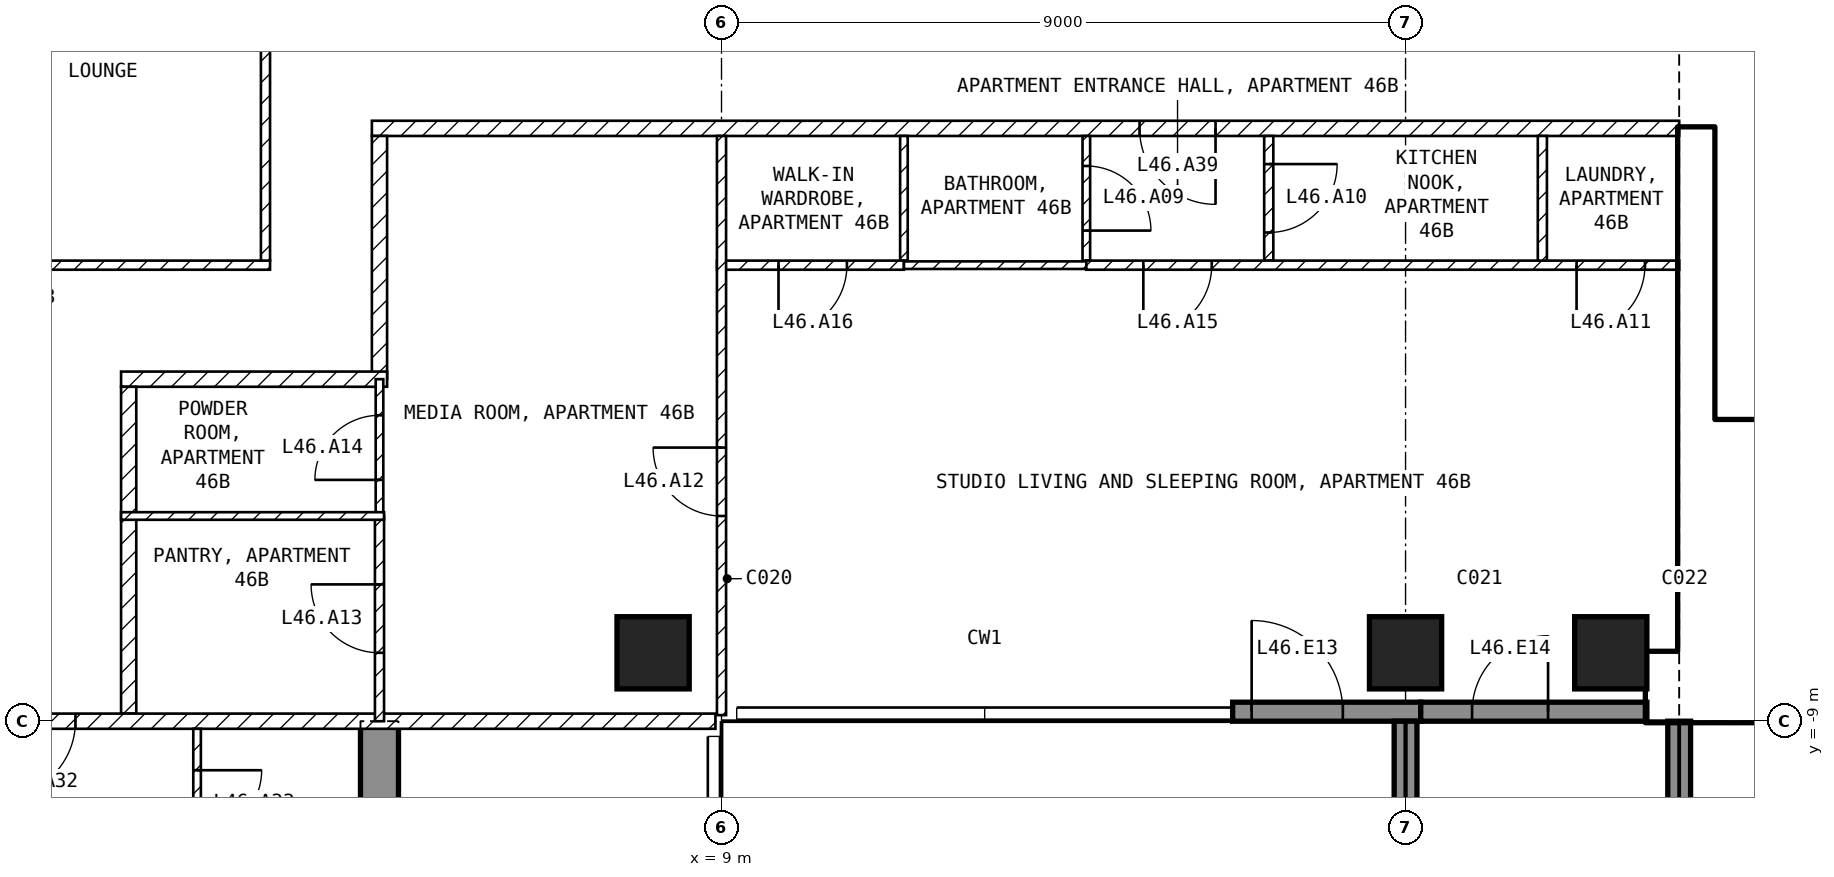
"""IFC4 building model, lengths in metres.
Left out: names, types, materials, properties, quantities, classifications, styles, units other than length and angle.
Written with IfcOpenShell. Run it as: python <this file> out.ifc"""

import sys

from ifc_helpers import new_model, si_unit, direction, frame, frame_2d, origin, origin_2d, place, context, subcontext, project, spatial, polyline, rectangle, outline, extrude, element, fill, save


model = new_model("IFC4")
c1 = context("Model", 3, precision=1e-05, world=origin(), true_north=direction((0.0, 1.0)))
c2 = subcontext(c1, "Body", "Model", "MODEL_VIEW")
j1 = project(units=[si_unit("LENGTHUNIT", "METRE"), si_unit("PLANEANGLEUNIT", "RADIAN")], contexts=[c1])
p1 = place(None, origin())
s1 = spatial("IfcSite", under=j1, at=p1, CompositionType="ELEMENT")
p2 = place(p1, origin())
s2 = spatial("IfcBuilding", under=s1, at=p2, CompositionType="ELEMENT")
p3 = place(p2, frame((0.0, 0.0, 187.6)))
s3 = spatial("IfcBuildingStorey", under=s2, at=p3, CompositionType="ELEMENT", Elevation=187.6)
for number, where, z_axis, x_axis in (
    (1, (8.1, -8.1, -0.25), (0.0, 0.0, 1.0), (1.0, 0.0, 0.0)),
    (2, (18.0, -8.1, -0.25), (0.0, 0.0, 1.0), (1.0, 0.0, 0.0)),
    (3, (20.7, -8.1, -0.25), (0.0, 0.0, 1.0), (1.0, 0.0, 0.0)),
):
    element("IfcColumn", number, at=place(p3, frame(where, z_axis=z_axis, x_axis=x_axis)), inside=s3, PredefinedType="COLUMN", context=c2, shape_type="SweptSolid", body=[
        extrude(rectangle(XDim=0.95, YDim=0.95, at=origin_2d()), origin(), (0.0, 0.0, 1.0), 3.5),
    ])
p4 = place(p3, frame((4.25, -20.225, -0.25), z_axis=(1.0, 0.0, 0.0), x_axis=(0.0, 1.0, 0.0)))
e4 = element("IfcWall", 4, at=p4, inside=s3, PredefinedType="SHEAR", context=c2, shape_type="SweptSolid", body=[
    extrude(outline(polyline([(0.0, 0.0), (6.725, 0.0), (6.725, 2.65), (9.125, 2.65), (9.125, 0.0), (11.225, 0.0), (11.225, 3.5), (0.0, 3.5), (0.0, 0.0)])), origin(), (0.0, 0.0, 1.0), 0.5),
])
p5 = place(p3, frame((15.725, -8.875, 0.0), z_axis=(0.0, 0.0, 1.0), x_axis=(1.0, 0.0, 0.0)))
e5 = element("IfcWall", 5, at=p5, inside=s3, PredefinedType="SOLIDWALL", context=c2, shape_type="SweptSolid", body=[
    extrude(rectangle(XDim=2.475, YDim=0.25, at=frame_2d((1.237, 0.0))), origin(), (0.0, 0.0, 1.0), 3.25),
])
p6 = place(p5, frame((0.25, 0.0, 0.0)))
e6 = element("IfcOpeningElement", 6, at=p6, cuts=e5, PredefinedType="OPENING", context=c2, shape_type="SweptSolid", body=[
    extrude(rectangle(XDim=1.2, YDim=2.4, at=frame_2d((0.6, 1.2))), frame((0.0, 0.135, 0.0), z_axis=(0.0, -1.0, 0.0), x_axis=(1.0, 0.0, 0.0)), (0.0, 0.0, 1.0), 0.27),
])
p7 = place(p3, frame((18.2, -8.875, 0.0), z_axis=(0.0, 0.0, 1.0), x_axis=(1.0, 0.0, 0.0)))
e7 = element("IfcWall", 7, at=p7, inside=s3, PredefinedType="SOLIDWALL", context=c2, shape_type="SweptSolid", body=[
    extrude(rectangle(XDim=2.975, YDim=0.25, at=frame_2d((1.488, 0.0))), origin(), (0.0, 0.0, 1.0), 3.25),
])
p8 = place(p7, frame((0.675, 0.0, 0.0)))
e8 = element("IfcOpeningElement", 8, at=p8, cuts=e7, PredefinedType="OPENING", context=c2, shape_type="SweptSolid", body=[
    extrude(rectangle(XDim=1.0, YDim=2.4, at=frame_2d((0.5, 1.2))), frame((0.0, 0.135, 0.0), z_axis=(0.0, -1.0, 0.0), x_axis=(1.0, 0.0, 0.0)), (0.0, 0.0, 1.0), 0.27),
])
for number, where, z_axis, x_axis in (
    (9, (18.0, -9.0, 0.0), (0.0, 0.0, 1.0), (0.0, -1.0, 0.0)),
    (10, (21.6, -9.0, 0.0), (0.0, 0.0, 1.0), (0.0, -1.0, 0.0)),
):
    element("IfcWall", number, at=place(p3, frame(where, z_axis=z_axis, x_axis=x_axis)), inside=s3, PredefinedType="SOLIDWALL", context=c2, shape_type="SweptSolid", body=[
        extrude(rectangle(XDim=2.7, YDim=0.3, at=frame_2d((1.35, 0.0))), origin(), (0.0, 0.0, 1.0), 3.25),
    ])
p9 = place(p3, frame((21.175, -8.55, 0.0), z_axis=(0.0, 0.0, 1.0), x_axis=(1.0, 0.0, 0.0)))
e11 = element("IfcWall", 11, at=p9, inside=s3, PredefinedType="SHEAR", context=c2, shape_type="SweptSolid", body=[
    extrude(rectangle(XDim=9.025, YDim=0.9, at=frame_2d((4.512, 0.0))), origin(), (0.0, 0.0, 1.0), 3.25),
])
p10 = place(p3, frame((21.825, -8.1, 0.0), z_axis=(0.0, 0.0, 1.0), x_axis=(0.0, 1.0, 0.0)))
e12 = element("IfcWall", 12, at=p10, inside=s3, PredefinedType="SHEAR", context=c2, shape_type="SweptSolid", body=[
    extrude(rectangle(XDim=6.9, YDim=0.45, at=frame_2d((3.45, 0.0))), origin(), (0.0, 0.0, 1.0), 3.25),
])
p11 = place(p3, frame((22.05, -5.15, 0.0), z_axis=(0.0, 0.0, 1.0), x_axis=(1.0, 0.0, 0.0)))
e13 = element("IfcWall", 13, at=p11, inside=s3, PredefinedType="SOLIDWALL", context=c2, shape_type="SweptSolid", body=[
    extrude(rectangle(XDim=6.3, YDim=0.2, at=frame_2d((3.15, 0.0))), origin(), (0.0, 0.0, 1.0), 3.25),
])
p12 = place(p11, frame((0.2, 0.0, 0.0)))
e14 = element("IfcOpeningElement", 14, at=p12, cuts=e13, PredefinedType="OPENING", context=c2, shape_type="SweptSolid", body=[
    extrude(rectangle(XDim=1.0, YDim=2.1, at=frame_2d((0.5, 1.05))), frame((0.0, 0.11, 0.0), z_axis=(0.0, -1.0, 0.0), x_axis=(1.0, 0.0, 0.0)), (0.0, 0.0, 1.0), 0.22),
])
p13 = place(p3, frame((-3.06, -3.0, 0.0), z_axis=(0.0, 0.0, 1.0), x_axis=(1.0, 0.0, 0.0)))
e15 = element("IfcWall", 15, at=p13, inside=s3, PredefinedType="PARTITIONING", context=c2, shape_type="SweptSolid", body=[
    extrude(rectangle(XDim=6.12, YDim=0.12, at=frame_2d((3.06, 0.0))), origin(), (0.0, 0.0, 1.0), 3.25),
])
p14 = place(p3, frame((3.0, -2.94, 0.0), z_axis=(0.0, 0.0, 1.0), x_axis=(0.0, 1.0, 0.0)))
e16 = element("IfcWall", 16, at=p14, inside=s3, PredefinedType="PARTITIONING", context=c2, shape_type="SweptSolid", body=[
    extrude(rectangle(XDim=5.88, YDim=0.12, at=frame_2d((2.94, 0.0))), origin(), (0.0, 0.0, 1.0), 3.25),
])
p15 = place(p3, frame((21.6, -1.2, 0.0), z_axis=(0.0, 0.0, 1.0), x_axis=(-1.0, 0.0, 0.0)))
e17 = element("IfcWall", 17, at=p15, inside=s3, PredefinedType="PARTITIONING", context=c2, shape_type="SweptSolid", body=[
    extrude(rectangle(XDim=17.2, YDim=0.2, at=frame_2d((8.6, 0.0))), origin(), (0.0, 0.0, 1.0), 3.25),
])
p16 = place(p15, frame((6.1, 0.0, 0.0)))
e18 = element("IfcOpeningElement", 18, at=p16, cuts=e17, PredefinedType="OPENING", context=c2, shape_type="SweptSolid", body=[
    extrude(rectangle(XDim=1.0, YDim=2.1, at=frame_2d((0.5, 1.05))), frame((0.0, 0.11, 0.0), z_axis=(0.0, -1.0, 0.0), x_axis=(1.0, 0.0, 0.0)), (0.0, 0.0, 1.0), 0.22),
])
p17 = place(p3, frame((4.5, -1.3, 0.0), z_axis=(0.0, 0.0, 1.0), x_axis=(0.0, -1.0, 0.0)))
e19 = element("IfcWall", 19, at=p17, inside=s3, PredefinedType="PARTITIONING", context=c2, shape_type="SweptSolid", body=[
    extrude(rectangle(XDim=3.2, YDim=0.2, at=frame_2d((1.6, 0.0))), origin(), (0.0, 0.0, 1.0), 3.25),
])
p18 = place(p3, frame((4.6, -4.5, 0.0), z_axis=(0.0, 0.0, 1.0), x_axis=(-1.0, 0.0, 0.0)))
e20 = element("IfcWall", 20, at=p18, inside=s3, PredefinedType="PARTITIONING", context=c2, shape_type="SweptSolid", body=[
    extrude(rectangle(XDim=3.5, YDim=0.2, at=frame_2d((1.75, 0.0))), origin(), (0.0, 0.0, 1.0), 3.25),
])
p19 = place(p3, frame((1.2, -4.6, 0.0), z_axis=(0.0, 0.0, 1.0), x_axis=(0.0, -1.0, 0.0)))
e21 = element("IfcWall", 21, at=p19, inside=s3, PredefinedType="PARTITIONING", context=c2, shape_type="SweptSolid", body=[
    extrude(rectangle(XDim=4.3, YDim=0.2, at=frame_2d((2.15, 0.0))), origin(), (0.0, 0.0, 1.0), 3.25),
])
p20 = place(p3, frame((8.92, -9.0, 0.0), z_axis=(0.0, 0.0, 1.0), x_axis=(-1.0, 0.0, 0.0)))
e22 = element("IfcWall", 22, at=p20, inside=s3, PredefinedType="PARTITIONING", context=c2, shape_type="SweptSolid", body=[
    extrude(rectangle(XDim=17.84, YDim=0.2, at=frame_2d((8.92, 0.0))), origin(), (0.0, 0.0, 1.0), 3.25),
])
p21 = place(p20, frame((8.42, 0.0, 0.0)))
e23 = element("IfcOpeningElement", 23, at=p21, cuts=e22, PredefinedType="OPENING", context=c2, shape_type="SweptSolid", body=[
    extrude(rectangle(XDim=1.0, YDim=2.1, at=frame_2d((0.5, 1.05))), frame((0.0, 0.11, 0.0), z_axis=(0.0, -1.0, 0.0), x_axis=(1.0, 0.0, 0.0)), (0.0, 0.0, 1.0), 0.22),
])
p22 = place(p3, frame((11.4, -1.3, 0.0), z_axis=(0.0, 0.0, 1.0), x_axis=(0.0, -1.0, 0.0)))
e24 = element("IfcWall", 24, at=p22, inside=s3, PredefinedType="PARTITIONING", context=c2, shape_type="SweptSolid", body=[
    extrude(rectangle(XDim=1.64, YDim=0.1, at=frame_2d((0.82, 0.0))), origin(), (0.0, 0.0, 1.0), 3.25),
])
p23 = place(p3, frame((11.4, -3.0, 0.0), z_axis=(0.0, 0.0, 1.0), x_axis=(-1.0, 0.0, 0.0)))
e25 = element("IfcWall", 25, at=p23, inside=s3, PredefinedType="PARTITIONING", context=c2, shape_type="SweptSolid", body=[
    extrude(rectangle(XDim=2.46, YDim=0.12, at=frame_2d((1.23, 0.0))), origin(), (0.0, 0.0, 1.0), 3.25),
])
p24 = place(p23, frame((0.75, 0.0, 0.0)))
e26 = element("IfcOpeningElement", 26, at=p24, cuts=e25, PredefinedType="OPENING", context=c2, shape_type="SweptSolid", body=[
    extrude(rectangle(XDim=0.9, YDim=2.1, at=frame_2d((0.45, 1.05))), frame((0.0, 0.07, 0.0), z_axis=(0.0, -1.0, 0.0), x_axis=(1.0, 0.0, 0.0)), (0.0, 0.0, 1.0), 0.14),
])
p25 = place(p3, frame((9.0, -8.92, 0.0), z_axis=(0.0, 0.0, 1.0), x_axis=(0.0, 1.0, 0.0)))
e27 = element("IfcWall", 27, at=p25, inside=s3, PredefinedType="PARTITIONING", context=c2, shape_type="SweptSolid", body=[
    extrude(rectangle(XDim=7.62, YDim=0.12, at=frame_2d((3.81, 0.0))), origin(), (0.0, 0.0, 1.0), 3.25),
])
p26 = place(p25, frame((2.62, 0.0, 0.0)))
e28 = element("IfcOpeningElement", 28, at=p26, cuts=e27, PredefinedType="OPENING", context=c2, shape_type="SweptSolid", body=[
    extrude(rectangle(XDim=0.9, YDim=2.1, at=frame_2d((0.45, 1.05))), frame((0.0, 0.07, 0.0), z_axis=(0.0, -1.0, 0.0), x_axis=(1.0, 0.0, 0.0)), (0.0, 0.0, 1.0), 0.14),
])
p27 = place(p3, frame((13.8, -1.3, 0.0), z_axis=(0.0, 0.0, 1.0), x_axis=(0.0, -1.0, 0.0)))
e29 = element("IfcWall", 29, at=p27, inside=s3, PredefinedType="PARTITIONING", context=c2, shape_type="SweptSolid", body=[
    extrude(rectangle(XDim=1.64, YDim=0.1, at=frame_2d((0.82, 0.0))), origin(), (0.0, 0.0, 1.0), 3.25),
])
p28 = place(p27, frame((0.395, 0.0, 0.0)))
e30 = element("IfcOpeningElement", 30, at=p28, cuts=e29, PredefinedType="OPENING", context=c2, shape_type="SweptSolid", body=[
    extrude(rectangle(XDim=0.85, YDim=2.1, at=frame_2d((0.425, 1.05))), frame((0.0, 0.06, 0.0), z_axis=(0.0, -1.0, 0.0), x_axis=(1.0, 0.0, 0.0)), (0.0, 0.0, 1.0), 0.12),
])
p29 = place(p3, frame((13.8, -3.0, 0.0), z_axis=(0.0, 0.0, 1.0), x_axis=(-1.0, 0.0, 0.0)))
e31 = element("IfcWall", 31, at=p29, inside=s3, PredefinedType="PARTITIONING", context=c2, shape_type="SweptSolid", body=[
    extrude(rectangle(XDim=2.4, YDim=0.1, at=frame_2d((1.2, 0.0))), origin(), (0.0, 0.0, 1.0), 3.25),
])
p30 = place(p3, frame((16.2, -1.3, 0.0), z_axis=(0.0, 0.0, 1.0), x_axis=(0.0, -1.0, 0.0)))
e32 = element("IfcWall", 32, at=p30, inside=s3, PredefinedType="PARTITIONING", context=c2, shape_type="SweptSolid", body=[
    extrude(rectangle(XDim=1.64, YDim=0.12, at=frame_2d((0.82, 0.0))), origin(), (0.0, 0.0, 1.0), 3.25),
])
p31 = place(p30, frame((0.37, 0.0, 0.0)))
e33 = element("IfcOpeningElement", 33, at=p31, cuts=e32, PredefinedType="OPENING", context=c2, shape_type="SweptSolid", body=[
    extrude(rectangle(XDim=0.9, YDim=2.1, at=frame_2d((0.45, 1.05))), frame((0.0, 0.07, 0.0), z_axis=(0.0, -1.0, 0.0), x_axis=(1.0, 0.0, 0.0)), (0.0, 0.0, 1.0), 0.14),
])
p32 = place(p3, frame((21.6, -3.0, 0.0), z_axis=(0.0, 0.0, 1.0), x_axis=(-1.0, 0.0, 0.0)))
e34 = element("IfcWall", 34, at=p32, inside=s3, PredefinedType="PARTITIONING", context=c2, shape_type="SweptSolid", body=[
    extrude(rectangle(XDim=7.8, YDim=0.12, at=frame_2d((3.9, 0.0))), origin(), (0.0, 0.0, 1.0), 3.25),
])
p33 = place(p32, frame((0.45, 0.0, 0.0)))
e35 = element("IfcOpeningElement", 35, at=p33, cuts=e34, PredefinedType="OPENING", context=c2, shape_type="SweptSolid", body=[
    extrude(rectangle(XDim=0.9, YDim=2.1, at=frame_2d((0.45, 1.05))), frame((0.0, 0.07, 0.0), z_axis=(0.0, -1.0, 0.0), x_axis=(1.0, 0.0, 0.0)), (0.0, 0.0, 1.0), 0.14),
])
p34 = place(p32, frame((6.15, 0.0, 0.0)))
e36 = element("IfcOpeningElement", 36, at=p34, cuts=e34, PredefinedType="OPENING", context=c2, shape_type="SweptSolid", body=[
    extrude(rectangle(XDim=0.9, YDim=2.1, at=frame_2d((0.45, 1.05))), frame((0.0, 0.07, 0.0), z_axis=(0.0, -1.0, 0.0), x_axis=(1.0, 0.0, 0.0)), (0.0, 0.0, 1.0), 0.14),
])
p35 = place(p3, frame((19.8, -1.3, 0.0), z_axis=(0.0, 0.0, 1.0), x_axis=(0.0, -1.0, 0.0)))
e37 = element("IfcWall", 37, at=p35, inside=s3, PredefinedType="PARTITIONING", context=c2, shape_type="SweptSolid", body=[
    extrude(rectangle(XDim=1.64, YDim=0.12, at=frame_2d((0.82, 0.0))), origin(), (0.0, 0.0, 1.0), 3.25),
])
p36 = place(p3, frame((4.5, -6.3, 0.0), z_axis=(0.0, 0.0, 1.0), x_axis=(0.0, 1.0, 0.0)))
e38 = element("IfcWall", 38, at=p36, inside=s3, PredefinedType="PARTITIONING", context=c2, shape_type="SweptSolid", body=[
    extrude(rectangle(XDim=1.8, YDim=0.1, at=frame_2d((0.9, 0.0))), origin(), (0.0, 0.0, 1.0), 3.25),
])
p37 = place(p36, frame((0.475, 0.0, 0.0)))
e39 = element("IfcOpeningElement", 39, at=p37, cuts=e38, PredefinedType="OPENING", context=c2, shape_type="SweptSolid", body=[
    extrude(rectangle(XDim=0.85, YDim=2.1, at=frame_2d((0.425, 1.05))), frame((0.0, 0.06, 0.0), z_axis=(0.0, -1.0, 0.0), x_axis=(1.0, 0.0, 0.0)), (0.0, 0.0, 1.0), 0.12),
])
p38 = place(p3, frame((4.5, -9.0, 0.0), z_axis=(0.0, 0.0, 1.0), x_axis=(0.0, 1.0, 0.0)))
e40 = element("IfcWall", 40, at=p38, inside=s3, PredefinedType="PARTITIONING", context=c2, shape_type="SweptSolid", body=[
    extrude(rectangle(XDim=2.7, YDim=0.12, at=frame_2d((1.35, 0.0))), origin(), (0.0, 0.0, 1.0), 3.25),
])
p39 = place(p38, frame((0.9, 0.0, 0.0)))
e41 = element("IfcOpeningElement", 41, at=p39, cuts=e40, PredefinedType="OPENING", context=c2, shape_type="SweptSolid", body=[
    extrude(rectangle(XDim=0.9, YDim=2.1, at=frame_2d((0.45, 1.05))), frame((0.0, 0.07, 0.0), z_axis=(0.0, -1.0, 0.0), x_axis=(1.0, 0.0, 0.0)), (0.0, 0.0, 1.0), 0.14),
])
p40 = place(p3, frame((4.56, -6.3, 0.0), z_axis=(0.0, 0.0, 1.0), x_axis=(-1.0, 0.0, 0.0)))
e42 = element("IfcWall", 42, at=p40, inside=s3, PredefinedType="PARTITIONING", context=c2, shape_type="SweptSolid", body=[
    extrude(rectangle(XDim=3.46, YDim=0.1, at=frame_2d((1.73, 0.0))), origin(), (0.0, 0.0, 1.0), 3.25),
])
p41 = place(p3, frame((2.1, -9.1, 0.0), z_axis=(0.0, 0.0, 1.0), x_axis=(0.0, -1.0, 0.0)))
e43 = element("IfcWall", 43, at=p41, inside=s3, PredefinedType="PARTITIONING", context=c2, shape_type="SweptSolid", body=[
    extrude(rectangle(XDim=1.94, YDim=0.1, at=frame_2d((0.97, 0.0))), origin(), (0.0, 0.0, 1.0), 3.25),
])
p42 = place(p41, frame((0.545, 0.0, 0.0)))
e44 = element("IfcOpeningElement", 44, at=p42, cuts=e43, PredefinedType="OPENING", context=c2, shape_type="SweptSolid", body=[
    extrude(rectangle(XDim=0.85, YDim=2.1, at=frame_2d((0.425, 1.05))), frame((0.0, 0.06, 0.0), z_axis=(0.0, -1.0, 0.0), x_axis=(1.0, 0.0, 0.0)), (0.0, 0.0, 1.0), 0.12),
])
p43 = place(p6, origin())
e45 = element("IfcDoor", 45, at=p43, inside=s3, OperationType="SINGLE_SWING_LEFT", PredefinedType="DOOR", context=c2, shape_type="SweptSolid", body=[
    extrude(rectangle(XDim=1.2, YDim=2.4, at=frame_2d((0.6, 1.2))), frame((0.0, 0.025, 0.0), z_axis=(0.0, -1.0, 0.0), x_axis=(1.0, 0.0, 0.0)), (0.0, 0.0, 1.0), 0.05),
])
fill(e6, e45)
p44 = place(p8, origin())
e46 = element("IfcDoor", 46, at=p44, inside=s3, OperationType="SINGLE_SWING_RIGHT", PredefinedType="DOOR", context=c2, shape_type="SweptSolid", body=[
    extrude(rectangle(XDim=1.0, YDim=2.4, at=frame_2d((0.5, 1.2))), frame((0.0, 0.025, 0.0), z_axis=(0.0, -1.0, 0.0), x_axis=(1.0, 0.0, 0.0)), (0.0, 0.0, 1.0), 0.05),
])
fill(e8, e46)
p45 = place(p12, origin())
e47 = element("IfcDoor", 47, at=p45, inside=s3, OperationType="SINGLE_SWING_LEFT", PredefinedType="DOOR", context=c2, shape_type="SweptSolid", body=[
    extrude(rectangle(XDim=1.0, YDim=2.1, at=frame_2d((0.5, 1.05))), frame((0.0, 0.025, 0.0), z_axis=(0.0, -1.0, 0.0), x_axis=(1.0, 0.0, 0.0)), (0.0, 0.0, 1.0), 0.05),
])
fill(e14, e47)
p46 = place(p28, origin())
e48 = element("IfcDoor", 48, at=p46, inside=s3, OperationType="SINGLE_SWING_RIGHT", PredefinedType="DOOR", context=c2, shape_type="SweptSolid", body=[
    extrude(rectangle(XDim=0.85, YDim=2.1, at=frame_2d((0.425, 1.05))), frame((0.0, 0.025, 0.0), z_axis=(0.0, -1.0, 0.0), x_axis=(1.0, 0.0, 0.0)), (0.0, 0.0, 1.0), 0.05),
])
fill(e30, e48)
p47 = place(p31, origin())
e49 = element("IfcDoor", 49, at=p47, inside=s3, OperationType="SINGLE_SWING_LEFT", PredefinedType="DOOR", context=c2, shape_type="SweptSolid", body=[
    extrude(rectangle(XDim=0.9, YDim=2.1, at=frame_2d((0.45, 1.05))), frame((0.0, 0.025, 0.0), z_axis=(0.0, -1.0, 0.0), x_axis=(1.0, 0.0, 0.0)), (0.0, 0.0, 1.0), 0.05),
])
fill(e33, e49)
p48 = place(p33, origin())
e50 = element("IfcDoor", 50, at=p48, inside=s3, OperationType="SINGLE_SWING_RIGHT", PredefinedType="DOOR", context=c2, shape_type="SweptSolid", body=[
    extrude(rectangle(XDim=0.9, YDim=2.1, at=frame_2d((0.45, 1.05))), frame((0.0, 0.025, 0.0), z_axis=(0.0, -1.0, 0.0), x_axis=(1.0, 0.0, 0.0)), (0.0, 0.0, 1.0), 0.05),
])
fill(e35, e50)
p49 = place(p26, origin())
e51 = element("IfcDoor", 51, at=p49, inside=s3, OperationType="SINGLE_SWING_RIGHT", PredefinedType="DOOR", context=c2, shape_type="SweptSolid", body=[
    extrude(rectangle(XDim=0.9, YDim=2.1, at=frame_2d((0.45, 1.05))), frame((0.0, 0.025, 0.0), z_axis=(0.0, -1.0, 0.0), x_axis=(1.0, 0.0, 0.0)), (0.0, 0.0, 1.0), 0.05),
])
fill(e28, e51)
p50 = place(p39, origin())
e52 = element("IfcDoor", 52, at=p50, inside=s3, OperationType="SINGLE_SWING_RIGHT", PredefinedType="DOOR", context=c2, shape_type="SweptSolid", body=[
    extrude(rectangle(XDim=0.9, YDim=2.1, at=frame_2d((0.45, 1.05))), frame((0.0, 0.025, 0.0), z_axis=(0.0, -1.0, 0.0), x_axis=(1.0, 0.0, 0.0)), (0.0, 0.0, 1.0), 0.05),
])
fill(e41, e52)
p51 = place(p37, origin())
e53 = element("IfcDoor", 53, at=p51, inside=s3, OperationType="SINGLE_SWING_LEFT", PredefinedType="DOOR", context=c2, shape_type="SweptSolid", body=[
    extrude(rectangle(XDim=0.85, YDim=2.1, at=frame_2d((0.425, 1.05))), frame((0.0, 0.025, 0.0), z_axis=(0.0, -1.0, 0.0), x_axis=(1.0, 0.0, 0.0)), (0.0, 0.0, 1.0), 0.05),
])
fill(e39, e53)
p52 = place(p34, origin())
e54 = element("IfcDoor", 54, at=p52, inside=s3, OperationType="SINGLE_SWING_RIGHT", PredefinedType="DOOR", context=c2, shape_type="SweptSolid", body=[
    extrude(rectangle(XDim=0.9, YDim=2.1, at=frame_2d((0.45, 1.05))), frame((0.0, 0.025, 0.0), z_axis=(0.0, -1.0, 0.0), x_axis=(1.0, 0.0, 0.0)), (0.0, 0.0, 1.0), 0.05),
])
fill(e36, e54)
p53 = place(p24, origin())
e55 = element("IfcDoor", 55, at=p53, inside=s3, OperationType="SINGLE_SWING_RIGHT", PredefinedType="DOOR", context=c2, shape_type="SweptSolid", body=[
    extrude(rectangle(XDim=0.9, YDim=2.1, at=frame_2d((0.45, 1.05))), frame((0.0, 0.025, 0.0), z_axis=(0.0, -1.0, 0.0), x_axis=(1.0, 0.0, 0.0)), (0.0, 0.0, 1.0), 0.05),
])
fill(e26, e55)
p54 = place(p21, origin())
e56 = element("IfcDoor", 56, at=p54, inside=s3, OperationType="SINGLE_SWING_RIGHT", PredefinedType="DOOR", context=c2, shape_type="SweptSolid", body=[
    extrude(rectangle(XDim=1.0, YDim=2.1, at=frame_2d((0.5, 1.05))), frame((0.0, 0.025, 0.0), z_axis=(0.0, -1.0, 0.0), x_axis=(1.0, 0.0, 0.0)), (0.0, 0.0, 1.0), 0.05),
])
fill(e23, e56)
p55 = place(p42, origin())
e57 = element("IfcDoor", 57, at=p55, inside=s3, OperationType="SINGLE_SWING_LEFT", PredefinedType="DOOR", context=c2, shape_type="SweptSolid", body=[
    extrude(rectangle(XDim=0.85, YDim=2.1, at=frame_2d((0.425, 1.05))), frame((0.0, 0.025, 0.0), z_axis=(0.0, -1.0, 0.0), x_axis=(1.0, 0.0, 0.0)), (0.0, 0.0, 1.0), 0.05),
])
fill(e44, e57)
p56 = place(p16, origin())
e58 = element("IfcDoor", 58, at=p56, inside=s3, OperationType="SINGLE_SWING_LEFT", PredefinedType="DOOR", context=c2, shape_type="SweptSolid", body=[
    extrude(rectangle(XDim=1.0, YDim=2.1, at=frame_2d((0.5, 1.05))), frame((0.0, 0.025, 0.0), z_axis=(0.0, -1.0, 0.0), x_axis=(1.0, 0.0, 0.0)), (0.0, 0.0, 1.0), 0.05),
])
fill(e18, e58)
save(model, sys.argv[1])
